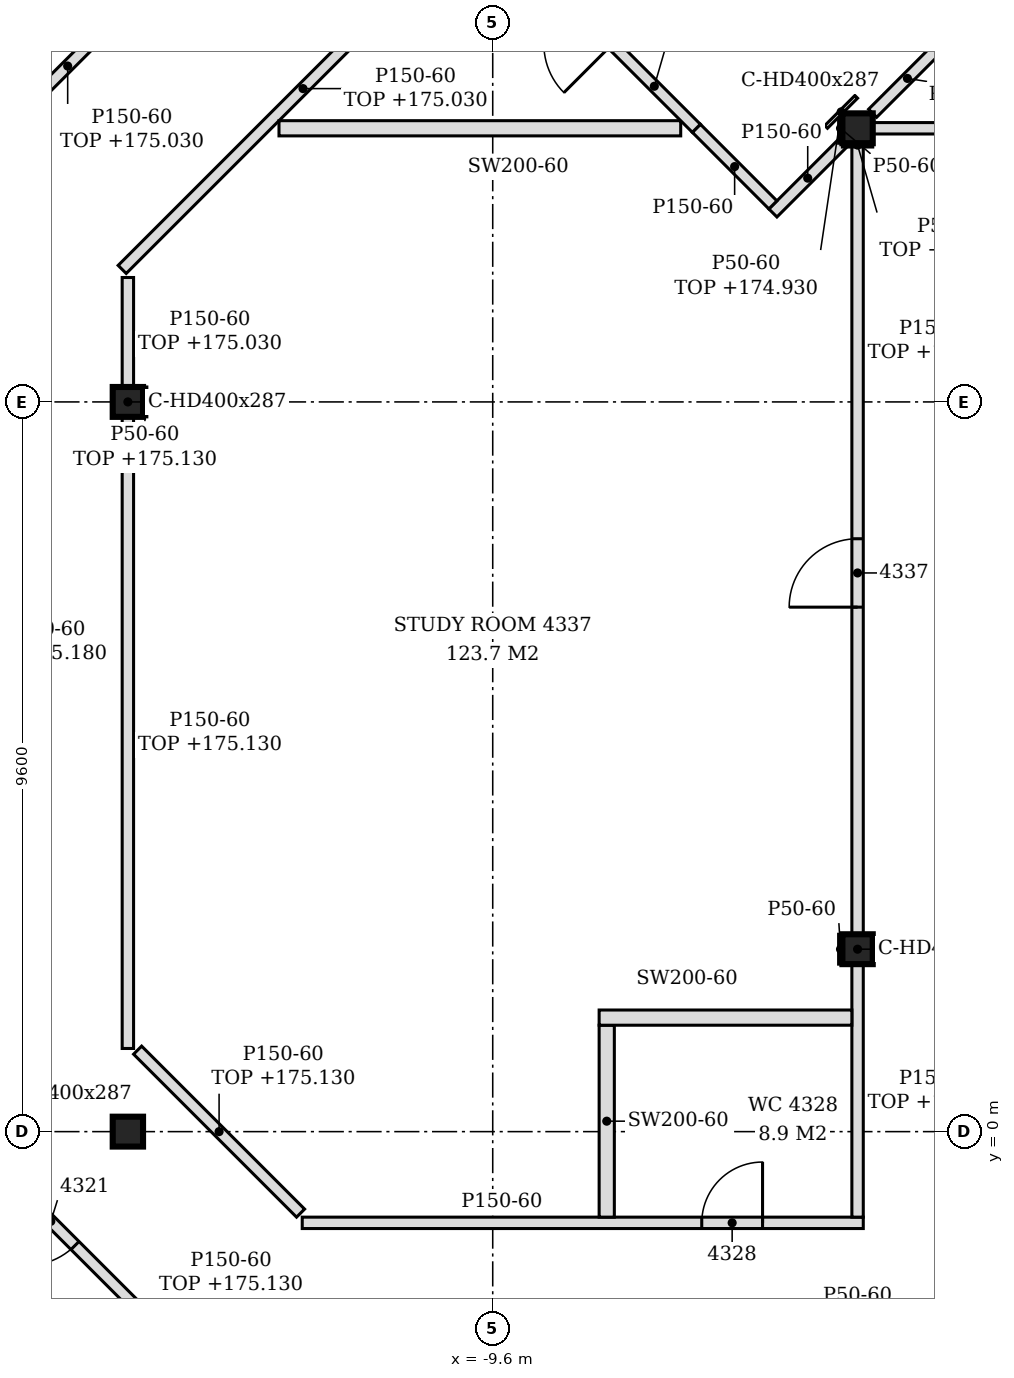
"""IFC4 building model, lengths in metres.
Left out: names, types, materials, properties, quantities, classifications, styles, units other than length and angle.
Written with IfcOpenShell. Run it as: python <this file> out.ifc"""

import sys

from ifc_helpers import new_model, si_unit, direction, frame, frame_2d, origin, origin_2d, place, context, subcontext, project, spatial, polyline, rectangle, i_section, outline, extrude, element, fill, save


model = new_model("IFC4")
c1 = context("Model", 3, precision=1e-05, world=origin(), true_north=direction((0.0, 1.0)))
c2 = subcontext(c1, "Body", "Model", "MODEL_VIEW")
j1 = project(units=[si_unit("LENGTHUNIT", "METRE"), si_unit("PLANEANGLEUNIT", "RADIAN")], contexts=[c1])
p1 = place(None, origin())
s1 = spatial("IfcSite", under=j1, at=p1, CompositionType="ELEMENT")
p2 = place(p1, origin())
s2 = spatial("IfcBuilding", under=s1, at=p2, CompositionType="ELEMENT")
p3 = place(p2, frame((0.0, 0.0, 172.2)))
s3 = spatial("IfcBuildingStorey", under=s2, at=p3, CompositionType="ELEMENT", Elevation=172.2)
for number, where, z_axis, x_axis in (
    (1, (-4.8, 2.4, -0.15), (0.0, 0.0, 1.0), (1.0, 0.0, 0.0)),
    (2, (-4.8, 13.2, -0.15), (0.0, 0.0, 1.0), (1.0, 0.0, 0.0)),
    (3, (-14.4, 0.0, -0.15), (0.0, 0.0, 1.0), (1.0, 0.0, 0.0)),
    (4, (-14.4, 9.6, -0.15), (0.0, 0.0, 1.0), (1.0, 0.0, 0.0)),
):
    element("IfcColumn", number, at=place(p3, frame(where, z_axis=z_axis, x_axis=x_axis)), inside=s3, PredefinedType="COLUMN", context=c2, shape_type="SweptSolid", body=[
        extrude(i_section(OverallWidth=0.399, OverallDepth=0.393, WebThickness=0.023, FlangeThickness=0.037, FilletRadius=0.015, at=origin_2d()), origin(), (0.0, 0.0, 1.0), 3.6),
    ])
p4 = place(p3, frame((-8.322, -8.272, 0.0), z_axis=(0.0, 0.0, 1.0), x_axis=(-0.707117118476, 0.707096443746, 0.0)))
e5 = element("IfcWall", 5, at=p4, inside=s3, PredefinedType="PARTITIONING", context=c2, shape_type="SweptSolid", body=[
    extrude(rectangle(XDim=11.809, YDim=0.15, at=frame_2d((5.904, 0.0))), origin(), (0.0, 0.0, 1.0), 2.93),
])
p5 = place(p4, frame((9.579, 0.0, 0.0)))
e6 = element("IfcOpeningElement", 6, at=p5, cuts=e5, PredefinedType="OPENING", context=c2, shape_type="SweptSolid", body=[
    extrude(rectangle(XDim=0.9, YDim=2.1, at=frame_2d((0.45, 1.05))), frame((0.0, 0.085, 0.0), z_axis=(0.0, -1.0, 0.0), x_axis=(1.0, 0.0, 0.0)), (0.0, 0.0, 1.0), 0.17),
])
p6 = place(p4, frame((5.264, 0.0, 0.0)))
e7 = element("IfcOpeningElement", 7, at=p6, cuts=e5, PredefinedType="OPENING", context=c2, shape_type="SweptSolid", body=[
    extrude(rectangle(XDim=0.9, YDim=2.1, at=frame_2d((0.45, 1.05))), frame((0.0, 0.085, 0.0), z_axis=(0.0, -1.0, 0.0), x_axis=(1.0, 0.0, 0.0)), (0.0, 0.0, 1.0), 0.17),
])
p7 = place(p4, frame((1.139, 0.0, 0.0)))
e8 = element("IfcOpeningElement", 8, at=p7, cuts=e5, PredefinedType="OPENING", context=c2, shape_type="SweptSolid", body=[
    extrude(rectangle(XDim=0.9, YDim=2.1, at=frame_2d((0.45, 1.05))), frame((0.0, 0.085, 0.0), z_axis=(0.0, -1.0, 0.0), x_axis=(1.0, 0.0, 0.0)), (0.0, 0.0, 1.0), 0.17),
])
p8 = place(p3, frame((-12.106, -1.2, 0.0), z_axis=(0.0, 0.0, 1.0), x_axis=(1.0, 0.0, 0.0)))
e9 = element("IfcWall", 9, at=p8, inside=s3, PredefinedType="PARTITIONING", context=c2, shape_type="SweptSolid", body=[
    extrude(outline(polyline([(0.0, 0.0), (7.381, 0.0), (7.381, 2.83), (7.156, 2.83), (7.154, 3.45), (0.0, 3.45), (0.0, 0.0)])), frame((0.0, 0.075, 0.0), z_axis=(0.0, -1.0, 0.0), x_axis=(1.0, 0.0, 0.0)), (0.0, 0.0, 1.0), 0.15),
])
p9 = place(p8, frame((5.256, 0.0, 0.0)))
e10 = element("IfcOpeningElement", 10, at=p9, cuts=e9, PredefinedType="OPENING", context=c2, shape_type="SweptSolid", body=[
    extrude(rectangle(XDim=0.8, YDim=2.1, at=frame_2d((0.4, 1.05))), frame((0.0, 0.085, 0.0), z_axis=(0.0, -1.0, 0.0), x_axis=(1.0, 0.0, 0.0)), (0.0, 0.0, 1.0), 0.17),
])
p10 = place(p3, frame((-12.128, -1.072, 0.0), z_axis=(0.0, 0.0, 1.0), x_axis=(-0.707106781187, 0.707106781187, 0.0)))
e11 = element("IfcWall", 11, at=p10, inside=s3, PredefinedType="PARTITIONING", context=c2, shape_type="SweptSolid", body=[
    extrude(rectangle(XDim=3.032, YDim=0.15, at=frame_2d((1.516, 0.0))), origin(), (0.0, 0.0, 1.0), 2.93),
])
p11 = place(p3, frame((-8.1, -1.125, 0.0), z_axis=(0.0, 0.0, 1.0), x_axis=(0.0, 1.0, 0.0)))
e12 = element("IfcWall", 12, at=p11, inside=s3, PredefinedType="PARTITIONING", context=c2, shape_type="SweptSolid", body=[
    extrude(outline(polyline([(0.0, 0.0), (2.525, 0.0), (2.525, 3.45), (1.075, 3.45), (1.073, 2.93), (0.875, 2.93), (0.873, 3.45), (0.0, 3.45), (0.0, 0.0)])), frame((0.0, 0.1, 0.0), z_axis=(0.0, -1.0, 0.0), x_axis=(1.0, 0.0, 0.0)), (0.0, 0.0, 1.0), 0.2),
])
p12 = place(p3, frame((-4.8, -1.125, 0.0), z_axis=(0.0, 0.0, 1.0), x_axis=(0.0, 1.0, 0.0)))
e13 = element("IfcWall", 13, at=p12, inside=s3, PredefinedType="PARTITIONING", context=c2, shape_type="SweptSolid", body=[
    extrude(rectangle(XDim=3.329, YDim=0.15, at=frame_2d((1.664, 0.0))), origin(), (0.0, 0.0, 1.0), 2.83),
])
p13 = place(p3, frame((-14.4, 1.094, 0.0), z_axis=(0.0, 0.0, 1.0), x_axis=(0.0, 1.0, 0.0)))
e14 = element("IfcWall", 14, at=p13, inside=s3, PredefinedType="PARTITIONING", context=c2, shape_type="SweptSolid", body=[
    extrude(rectangle(XDim=8.31, YDim=0.15, at=frame_2d((4.155, 0.0))), origin(), (0.0, 0.0, 1.0), 2.93),
])
p14 = place(p3, frame((-8.2, 1.5, 0.0), z_axis=(0.0, 0.0, 1.0), x_axis=(1.0, 0.0, 0.0)))
e15 = element("IfcWall", 15, at=p14, inside=s3, PredefinedType="PARTITIONING", context=c2, shape_type="SweptSolid", body=[
    extrude(outline(polyline([(0.0, 0.0), (3.325, 0.0), (3.325, 2.83), (3.25, 2.83), (3.248, 3.45), (0.0, 3.45), (0.0, 0.0)])), frame((0.0, 0.1, 0.0), z_axis=(0.0, -1.0, 0.0), x_axis=(1.0, 0.0, 0.0)), (0.0, 0.0, 1.0), 0.2),
])
p15 = place(p3, frame((-4.8, 2.596, 0.0), z_axis=(0.0, 0.0, 1.0), x_axis=(0.0, 1.0, 0.0)))
e16 = element("IfcWall", 16, at=p15, inside=s3, PredefinedType="PARTITIONING", context=c2, shape_type="SweptSolid", body=[
    extrude(rectangle(XDim=10.407, YDim=0.15, at=frame_2d((5.204, 0.0))), origin(), (0.0, 0.0, 1.0), 2.83),
])
p16 = place(p15, frame((4.303, 0.0, 0.0)))
e17 = element("IfcOpeningElement", 17, at=p16, cuts=e16, PredefinedType="OPENING", context=c2, shape_type="SweptSolid", body=[
    extrude(rectangle(XDim=0.9, YDim=2.1, at=frame_2d((0.45, 1.05))), frame((0.0, 0.085, 0.0), z_axis=(0.0, -1.0, 0.0), x_axis=(1.0, 0.0, 0.0)), (0.0, 0.0, 1.0), 0.17),
])
p17 = place(p3, frame((-14.4, 9.796, 0.0), z_axis=(0.0, 0.0, 1.0), x_axis=(0.0, 1.0, 0.0)))
e18 = element("IfcWall", 18, at=p17, inside=s3, PredefinedType="PARTITIONING", context=c2, shape_type="SweptSolid", body=[
    extrude(rectangle(XDim=1.44, YDim=0.15, at=frame_2d((0.72, 0.0))), origin(), (0.0, 0.0, 1.0), 2.83),
])
p18 = place(p3, frame((-14.475, 11.343, 0.0), z_axis=(0.0, 0.0, 1.0), x_axis=(0.707124921665, 0.707088640243, 0.0)))
e19 = element("IfcWall", 19, at=p18, inside=s3, PredefinedType="PARTITIONING", context=c2, shape_type="SweptSolid", body=[
    extrude(rectangle(XDim=6.729, YDim=0.15, at=frame_2d((3.365, 0.0))), origin(), (0.0, 0.0, 1.0), 2.83),
])
p19 = place(p3, frame((-5.914, 12.086, 0.0), z_axis=(0.0, 0.0, 1.0), x_axis=(0.707106781187, 0.707106781187, 0.0)))
e20 = element("IfcWall", 20, at=p19, inside=s3, PredefinedType="PARTITIONING", context=c2, shape_type="SweptSolid", body=[
    extrude(rectangle(XDim=1.295, YDim=0.15, at=frame_2d((0.648, 0.0))), origin(), (0.0, 0.0, 1.0), 3.45),
])
p20 = place(p3, frame((-5.914, 12.192, 0.0), z_axis=(0.0, 0.0, 1.0), x_axis=(-0.706763941595, 0.707449454633, 0.0)))
e21 = element("IfcWall", 21, at=p20, inside=s3, PredefinedType="PARTITIONING", context=c2, shape_type="SweptSolid", body=[
    extrude(rectangle(XDim=1.425, YDim=0.15, at=frame_2d((0.712, 0.0))), origin(), (0.0, 0.0, 1.0), 3.45),
])
p21 = place(p3, frame((-12.412, 13.2, 0.0), z_axis=(0.0, 0.0, 1.0), x_axis=(1.0, 0.0, 0.0)))
e22 = element("IfcWall", 22, at=p21, inside=s3, PredefinedType="PARTITIONING", context=c2, shape_type="SweptSolid", body=[
    extrude(rectangle(XDim=5.285, YDim=0.2, at=frame_2d((2.643, 0.0))), origin(), (0.0, 0.0, 1.0), 3.45),
])
p22 = place(p3, frame((-6.921, 13.2, 0.0), z_axis=(0.0, 0.0, 1.0), x_axis=(-0.707230271715, 0.706983269088, 0.0)))
e23 = element("IfcWall", 23, at=p22, inside=s3, PredefinedType="PARTITIONING", context=c2, shape_type="SweptSolid", body=[
    extrude(rectangle(XDim=3.954, YDim=0.15, at=frame_2d((1.977, 0.0))), origin(), (0.0, 0.0, 1.0), 2.93),
])
p23 = place(p22, frame((1.564, 0.0, 0.0)))
e24 = element("IfcOpeningElement", 24, at=p23, cuts=e23, PredefinedType="OPENING", context=c2, shape_type="SweptSolid", body=[
    extrude(rectangle(XDim=0.9, YDim=2.1, at=frame_2d((0.45, 1.05))), frame((0.0, 0.085, 0.0), z_axis=(0.0, -1.0, 0.0), x_axis=(1.0, 0.0, 0.0)), (0.0, 0.0, 1.0), 0.17),
])
p24 = place(p3, frame((-4.601, 13.2, 0.0), z_axis=(0.0, 0.0, 1.0), x_axis=(1.0, 0.0, 0.0)))
e25 = element("IfcWall", 25, at=p24, inside=s3, PredefinedType="PARTITIONING", context=c2, shape_type="SweptSolid", body=[
    extrude(rectangle(XDim=9.476, YDim=0.15, at=frame_2d((4.738, 0.0))), origin(), (0.0, 0.0, 1.0), 2.83),
])
p25 = place(p24, frame((4.151, 0.0, 0.0)))
e26 = element("IfcOpeningElement", 26, at=p25, cuts=e25, PredefinedType="OPENING", context=c2, shape_type="SweptSolid", body=[
    extrude(rectangle(XDim=0.9, YDim=2.1, at=frame_2d((0.45, 1.05))), frame((0.0, 0.085, 0.0), z_axis=(0.0, -1.0, 0.0), x_axis=(1.0, 0.0, 0.0)), (0.0, 0.0, 1.0), 0.17),
])
p26 = place(p3, frame((-4.602, 13.398, 0.0), z_axis=(0.0, 0.0, 1.0), x_axis=(0.707106781187, 0.707106781187, 0.0)))
e27 = element("IfcWall", 27, at=p26, inside=s3, PredefinedType="PARTITIONING", context=c2, shape_type="SweptSolid", body=[
    extrude(rectangle(XDim=1.296, YDim=0.15, at=frame_2d((0.648, 0.0))), origin(), (0.0, 0.0, 1.0), 3.45),
])
p27 = place(p3, frame((-15.611, 13.6, 0.0), z_axis=(0.0, 0.0, 1.0), x_axis=(0.707145291481, 0.707068268794, 0.0)))
e28 = element("IfcWall", 28, at=p27, inside=s3, PredefinedType="PARTITIONING", context=c2, shape_type="SweptSolid", body=[
    extrude(rectangle(XDim=3.17, YDim=0.15, at=frame_2d((1.585, 0.0))), origin(), (0.0, 0.0, 1.0), 2.83),
])
p28 = place(p27, frame((1.185, 0.0, 0.0)))
e29 = element("IfcOpeningElement", 29, at=p28, cuts=e28, PredefinedType="OPENING", context=c2, shape_type="SweptSolid", body=[
    extrude(rectangle(XDim=0.9, YDim=2.1, at=frame_2d((0.45, 1.05))), frame((0.0, 0.085, 0.0), z_axis=(0.0, -1.0, 0.0), x_axis=(1.0, 0.0, 0.0)), (0.0, 0.0, 1.0), 0.17),
])
p29 = place(p3, frame((-5.024, 2.204, 0.0), z_axis=(0.0, 0.0, 1.0), x_axis=(0.0, 1.0, 0.0)))
e30 = element("IfcWall", 30, at=p29, inside=s3, PredefinedType="PARTITIONING", context=c2, shape_type="SweptSolid", body=[
    extrude(rectangle(XDim=0.393, YDim=0.05, at=frame_2d((0.196, 0.0))), origin(), (0.0, 0.0, 1.0), 3.45),
])
p30 = place(p3, frame((-5.024, 13.003, 0.0), z_axis=(0.0, 0.0, 1.0), x_axis=(0.0, 1.0, 0.0)))
e31 = element("IfcWall", 31, at=p30, inside=s3, PredefinedType="PARTITIONING", context=c2, shape_type="SweptSolid", body=[
    extrude(rectangle(XDim=0.393, YDim=0.05, at=frame_2d((0.197, 0.0))), origin(), (0.0, 0.0, 1.0), 3.45),
])
p31 = place(p3, frame((-14.176, 9.404, 0.0), z_axis=(0.0, 0.0, 1.0), x_axis=(0.0, 1.0, 0.0)))
e32 = element("IfcWall", 32, at=p31, inside=s3, PredefinedType="PARTITIONING", context=c2, shape_type="SweptSolid", body=[
    extrude(rectangle(XDim=0.393, YDim=0.05, at=frame_2d((0.196, 0.0))), origin(), (0.0, 0.0, 1.0), 2.93),
])
p32 = place(p3, frame((-5.214, 13.218, 0.0), z_axis=(0.0, 0.0, 1.0), x_axis=(0.707106781187, 0.707106781187, 0.0)))
e33 = element("IfcWall", 33, at=p32, inside=s3, PredefinedType="PARTITIONING", context=c2, shape_type="SweptSolid", body=[
    extrude(rectangle(XDim=0.56, YDim=0.05, at=frame_2d((0.28, 0.0))), origin(), (0.0, 0.0, 1.0), 2.73),
])
p33 = place(p3, frame((-5.0, 12.979, 0.0), z_axis=(0.0, 0.0, 1.0), x_axis=(1.0, 0.0, 0.0)))
e34 = element("IfcWall", 34, at=p33, inside=s3, PredefinedType="PARTITIONING", context=c2, shape_type="SweptSolid", body=[
    extrude(rectangle(XDim=0.399, YDim=0.05, at=frame_2d((0.199, 0.0))), origin(), (0.0, 0.0, 1.0), 2.83),
])
p34 = place(p5, origin())
e35 = element("IfcDoor", 35, at=p34, inside=s3, OperationType="SINGLE_SWING_RIGHT", PredefinedType="DOOR", context=c2, shape_type="SweptSolid", body=[
    extrude(rectangle(XDim=0.9, YDim=2.1, at=frame_2d((0.45, 1.05))), frame((0.0, 0.025, 0.0), z_axis=(0.0, -1.0, 0.0), x_axis=(1.0, 0.0, 0.0)), (0.0, 0.0, 1.0), 0.05),
])
fill(e6, e35)
p35 = place(p9, origin())
e36 = element("IfcDoor", 36, at=p35, inside=s3, OperationType="SINGLE_SWING_RIGHT", PredefinedType="DOOR", context=c2, shape_type="SweptSolid", body=[
    extrude(rectangle(XDim=0.8, YDim=2.1, at=frame_2d((0.4, 1.05))), frame((0.0, 0.025, 0.0), z_axis=(0.0, -1.0, 0.0), x_axis=(1.0, 0.0, 0.0)), (0.0, 0.0, 1.0), 0.05),
])
fill(e10, e36)
p36 = place(p16, origin())
e37 = element("IfcDoor", 37, at=p36, inside=s3, OperationType="SINGLE_SWING_LEFT", PredefinedType="DOOR", context=c2, shape_type="SweptSolid", body=[
    extrude(rectangle(XDim=0.9, YDim=2.1, at=frame_2d((0.45, 1.05))), frame((0.0, 0.025, 0.0), z_axis=(0.0, -1.0, 0.0), x_axis=(1.0, 0.0, 0.0)), (0.0, 0.0, 1.0), 0.05),
])
fill(e17, e37)
save(model, sys.argv[1])
